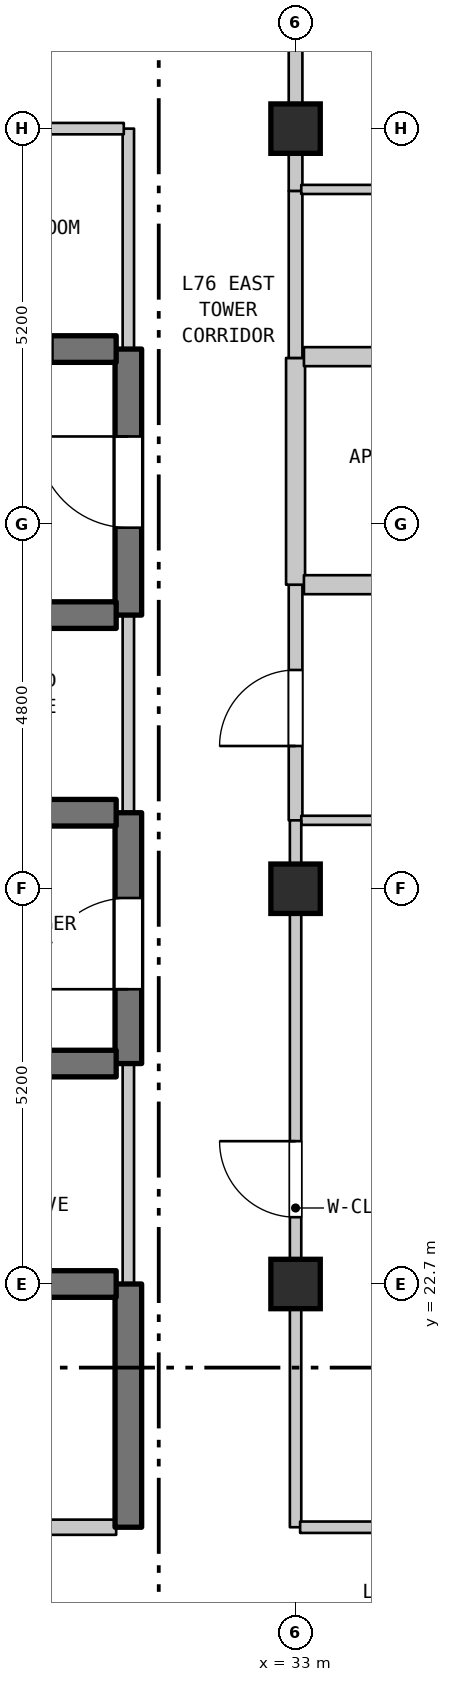
"""IFC4 building model, lengths in metres.
Left out: names, types, materials, properties, quantities, classifications, styles, units other than length and angle.
Written with IfcOpenShell. Run it as: python <this file> out.ifc"""

import sys

from ifc_helpers import new_model, si_unit, direction, frame, frame_2d, origin, origin_2d, place, context, subcontext, project, spatial, rectangle, extrude, element, fill, save


model = new_model("IFC4")
c1 = context("Model", 3, precision=1e-05, world=origin(), true_north=direction((0.0, 1.0)))
c2 = subcontext(c1, "Body", "Model", "MODEL_VIEW")
j1 = project(units=[si_unit("LENGTHUNIT", "METRE"), si_unit("PLANEANGLEUNIT", "RADIAN")], contexts=[c1])
p1 = place(None, origin())
s1 = spatial("IfcSite", under=j1, at=p1, CompositionType="ELEMENT")
p2 = place(p1, origin())
s2 = spatial("IfcBuilding", under=s1, at=p2, CompositionType="ELEMENT")
p3 = place(p2, frame((0.0, 0.0, 303.6)))
s3 = spatial("IfcBuildingStorey", under=s2, at=p3, CompositionType="ELEMENT", Elevation=303.6)
for number, where, z_axis, x_axis in (
    (1, (33.0, 22.7, 0.0), (0.0, 0.0, 1.0), (1.0, 0.0, 0.0)),
    (2, (33.0, 27.9, 0.0), (0.0, 0.0, 1.0), (1.0, 0.0, 0.0)),
    (3, (33.0, 37.9, 0.0), (0.0, 0.0, 1.0), (1.0, 0.0, 0.0)),
):
    element("IfcColumn", number, at=place(p3, frame(where, z_axis=z_axis, x_axis=x_axis)), inside=s3, PredefinedType="COLUMN", context=c2, shape_type="SweptSolid", body=[
        extrude(rectangle(XDim=0.65, YDim=0.65, at=origin_2d()), origin(), (0.0, 0.0, 1.0), 3.7),
    ])
p4 = place(p3, frame((30.8, 19.5, 0.0), z_axis=(0.0, 0.0, 1.0), x_axis=(0.0, 1.0, 0.0)))
e4 = element("IfcWall", 4, at=p4, inside=s3, PredefinedType="SHEAR", context=c2, shape_type="SweptSolid", body=[
    extrude(rectangle(XDim=3.2, YDim=0.35, at=frame_2d((1.6, 0.0))), origin(), (0.0, 0.0, 1.0), 3.39),
])
p5 = place(p3, frame((30.8, 22.7, 0.0), z_axis=(0.0, 0.0, 1.0), x_axis=(0.0, 1.0, 0.0)))
e5 = element("IfcWall", 5, at=p5, inside=s3, PredefinedType="STANDARD", context=c2, shape_type="SweptSolid", body=[
    extrude(rectangle(XDim=2.9, YDim=0.15, at=frame_2d((1.45, 0.0))), origin(), (0.0, 0.0, 1.0), 3.39),
])
p6 = place(p3, frame((30.8, 25.6, 0.0), z_axis=(0.0, 0.0, 1.0), x_axis=(0.0, 1.0, 0.0)))
e6 = element("IfcWall", 6, at=p6, inside=s3, PredefinedType="SHEAR", context=c2, shape_type="SweptSolid", body=[
    extrude(rectangle(XDim=3.3, YDim=0.35, at=frame_2d((1.65, 0.0))), origin(), (0.0, 0.0, 1.0), 3.39),
])
p7 = place(p6, frame((0.978, 0.0, 0.0)))
e7 = element("IfcOpeningElement", 7, at=p7, cuts=e6, PredefinedType="OPENING", context=c2, shape_type="SweptSolid", body=[
    extrude(rectangle(XDim=1.2, YDim=2.2, at=frame_2d((0.6, 1.1))), frame((0.0, 0.185, 0.0), z_axis=(0.0, -1.0, 0.0), x_axis=(1.0, 0.0, 0.0)), (0.0, 0.0, 1.0), 0.37),
])
p8 = place(p3, frame((30.8, 28.9, 0.0), z_axis=(0.0, 0.0, 1.0), x_axis=(0.0, 1.0, 0.0)))
e8 = element("IfcWall", 8, at=p8, inside=s3, PredefinedType="STANDARD", context=c2, shape_type="SweptSolid", body=[
    extrude(rectangle(XDim=2.6, YDim=0.15, at=frame_2d((1.3, 0.0))), origin(), (0.0, 0.0, 1.0), 3.39),
])
p9 = place(p3, frame((30.8, 31.5, 0.0), z_axis=(0.0, 0.0, 1.0), x_axis=(0.0, 1.0, 0.0)))
e9 = element("IfcWall", 9, at=p9, inside=s3, PredefinedType="SHEAR", context=c2, shape_type="SweptSolid", body=[
    extrude(rectangle(XDim=3.5, YDim=0.35, at=frame_2d((1.75, 0.0))), origin(), (0.0, 0.0, 1.0), 3.39),
])
p10 = place(p9, frame((1.15, 0.0, 0.0)))
e10 = element("IfcOpeningElement", 10, at=p10, cuts=e9, PredefinedType="OPENING", context=c2, shape_type="SweptSolid", body=[
    extrude(rectangle(XDim=1.2, YDim=2.2, at=frame_2d((0.6, 1.1))), frame((0.0, 0.185, 0.0), z_axis=(0.0, -1.0, 0.0), x_axis=(1.0, 0.0, 0.0)), (0.0, 0.0, 1.0), 0.37),
])
p11 = place(p3, frame((30.8, 35.0, 0.0), z_axis=(0.0, 0.0, 1.0), x_axis=(0.0, 1.0, 0.0)))
e11 = element("IfcWall", 11, at=p11, inside=s3, PredefinedType="STANDARD", context=c2, shape_type="SweptSolid", body=[
    extrude(rectangle(XDim=2.9, YDim=0.15, at=frame_2d((1.45, 0.0))), origin(), (0.0, 0.0, 1.0), 3.39),
])
p12 = place(p3, frame((33.0, 19.5, 0.0), z_axis=(0.0, 0.0, 1.0), x_axis=(0.0, 1.0, 0.0)))
e12 = element("IfcWall", 12, at=p12, inside=s3, PredefinedType="STANDARD", context=c2, shape_type="SweptSolid", body=[
    extrude(rectangle(XDim=8.4, YDim=0.15, at=frame_2d((4.2, 0.0))), origin(), (0.0, 0.0, 1.0), 3.1),
])
p13 = place(p12, frame((4.079, 0.0, 0.0)))
e13 = element("IfcOpeningElement", 13, at=p13, cuts=e12, PredefinedType="OPENING", context=c2, shape_type="SweptSolid", body=[
    extrude(rectangle(XDim=1.0, YDim=2.15, at=frame_2d((0.5, 1.075))), frame((0.0, 0.085, 0.0), z_axis=(0.0, -1.0, 0.0), x_axis=(1.0, 0.0, 0.0)), (0.0, 0.0, 1.0), 0.17),
])
p14 = place(p3, frame((33.0, 28.8, 0.0), z_axis=(0.0, 0.0, 1.0), x_axis=(0.0, 1.0, 0.0)))
e14 = element("IfcWall", 14, at=p14, inside=s3, PredefinedType="STANDARD", context=c2, shape_type="SweptSolid", body=[
    extrude(rectangle(XDim=3.1, YDim=0.18, at=frame_2d((1.55, 0.0))), origin(), (0.0, 0.0, 1.0), 2.89),
])
p15 = place(p14, frame((0.978, 0.0, 0.0)))
e15 = element("IfcOpeningElement", 15, at=p15, cuts=e14, PredefinedType="OPENING", context=c2, shape_type="SweptSolid", body=[
    extrude(rectangle(XDim=1.0, YDim=2.15, at=frame_2d((0.5, 1.075))), frame((0.0, 0.1, 0.0), z_axis=(0.0, -1.0, 0.0), x_axis=(1.0, 0.0, 0.0)), (0.0, 0.0, 1.0), 0.2),
])
p16 = place(p3, frame((33.0, 31.9, 0.0), z_axis=(0.0, 0.0, 1.0), x_axis=(0.0, 1.0, 0.0)))
e16 = element("IfcWall", 16, at=p16, inside=s3, PredefinedType="STANDARD", context=c2, shape_type="SweptSolid", body=[
    extrude(rectangle(XDim=2.983, YDim=0.25, at=frame_2d((1.492, 0.0))), origin(), (0.0, 0.0, 1.0), 2.89),
])
p17 = place(p3, frame((33.0, 34.883, 0.0), z_axis=(0.0, 0.0, 1.0), x_axis=(0.0, 1.0, 0.0)))
e17 = element("IfcWall", 17, at=p17, inside=s3, PredefinedType="STANDARD", context=c2, shape_type="SweptSolid", body=[
    extrude(rectangle(XDim=2.198, YDim=0.18, at=frame_2d((1.099, 0.0))), origin(), (0.0, 0.0, 1.0), 2.89),
])
p18 = place(p3, frame((33.0, 37.081, 0.0), z_axis=(0.0, 0.0, 1.0), x_axis=(0.0, 1.0, 0.0)))
e18 = element("IfcWall", 18, at=p18, inside=s3, PredefinedType="STANDARD", context=c2, shape_type="SweptSolid", body=[
    extrude(rectangle(XDim=0.819, YDim=0.18, at=frame_2d((0.409, 0.0))), origin(), (0.0, 0.0, 1.0), 2.89),
])
p19 = place(p3, frame((25.985, 19.5, 0.0), z_axis=(0.0, 0.0, 1.0), x_axis=(1.0, 0.0, 0.0)))
e19 = element("IfcWall", 19, at=p19, inside=s3, PredefinedType="STANDARD", context=c2, shape_type="SweptSolid", body=[
    extrude(rectangle(XDim=4.655, YDim=0.2, at=frame_2d((2.327, 0.0))), origin(), (0.0, 0.0, 1.0), 3.39),
])
p20 = place(p19, frame((1.845, 0.0, 0.0)))
e20 = element("IfcOpeningElement", 20, at=p20, cuts=e19, PredefinedType="OPENING", context=c2, shape_type="SweptSolid", body=[
    extrude(rectangle(XDim=0.9, YDim=2.15, at=frame_2d((0.45, 1.075))), frame((0.0, 0.11, 0.0), z_axis=(0.0, -1.0, 0.0), x_axis=(1.0, 0.0, 0.0)), (0.0, 0.0, 1.0), 0.22),
])
p21 = place(p3, frame((33.06, 19.5, 0.0), z_axis=(0.0, 0.0, 1.0), x_axis=(1.0, 0.0, 0.0)))
e21 = element("IfcWall", 21, at=p21, inside=s3, PredefinedType="STANDARD", context=c2, shape_type="SweptSolid", body=[
    extrude(rectangle(XDim=8.323, YDim=0.15, at=frame_2d((4.162, 0.0))), origin(), (0.0, 0.0, 1.0), 3.39),
])
p22 = place(p21, frame((3.583, 0.0, 0.0)))
e22 = element("IfcOpeningElement", 22, at=p22, cuts=e21, PredefinedType="OPENING", context=c2, shape_type="SweptSolid", body=[
    extrude(rectangle(XDim=1.0, YDim=2.15, at=frame_2d((0.5, 1.075))), frame((0.0, 0.085, 0.0), z_axis=(0.0, -1.0, 0.0), x_axis=(1.0, 0.0, 0.0)), (0.0, 0.0, 1.0), 0.17),
])
p23 = place(p3, frame((27.46, 22.7, 0.0), z_axis=(0.0, 0.0, 1.0), x_axis=(1.0, 0.0, 0.0)))
e23 = element("IfcWall", 23, at=p23, inside=s3, PredefinedType="SHEAR", context=c2, shape_type="SweptSolid", body=[
    extrude(rectangle(XDim=3.18, YDim=0.35, at=frame_2d((1.59, 0.0))), origin(), (0.0, 0.0, 1.0), 3.39),
])
p24 = place(p3, frame((27.46, 25.6, 0.0), z_axis=(0.0, 0.0, 1.0), x_axis=(1.0, 0.0, 0.0)))
e24 = element("IfcWall", 24, at=p24, inside=s3, PredefinedType="SHEAR", context=c2, shape_type="SweptSolid", body=[
    extrude(rectangle(XDim=3.18, YDim=0.35, at=frame_2d((1.59, 0.0))), origin(), (0.0, 0.0, 1.0), 3.39),
])
p25 = place(p24, frame((1.115, 0.0, 0.0)))
e25 = element("IfcOpeningElement", 25, at=p25, cuts=e24, PredefinedType="OPENING", context=c2, shape_type="SweptSolid", body=[
    extrude(rectangle(XDim=0.95, YDim=2.15, at=frame_2d((0.475, 1.075))), frame((0.0, 0.185, 0.0), z_axis=(0.0, -1.0, 0.0), x_axis=(1.0, 0.0, 0.0)), (0.0, 0.0, 1.0), 0.37),
])
p26 = place(p3, frame((33.075, 28.8, 0.0), z_axis=(0.0, 0.0, 1.0), x_axis=(1.0, 0.0, 0.0)))
e26 = element("IfcWall", 26, at=p26, inside=s3, PredefinedType="PARTITIONING", context=c2, shape_type="SweptSolid", body=[
    extrude(rectangle(XDim=11.707, YDim=0.12, at=frame_2d((5.854, 0.0))), origin(), (0.0, 0.0, 1.0), 3.39),
])
p27 = place(p3, frame((27.46, 28.9, 0.0), z_axis=(0.0, 0.0, 1.0), x_axis=(1.0, 0.0, 0.0)))
e27 = element("IfcWall", 27, at=p27, inside=s3, PredefinedType="SHEAR", context=c2, shape_type="SweptSolid", body=[
    extrude(rectangle(XDim=3.18, YDim=0.35, at=frame_2d((1.59, 0.0))), origin(), (0.0, 0.0, 1.0), 3.39),
])
p28 = place(p27, frame((1.115, 0.0, 0.0)))
e28 = element("IfcOpeningElement", 28, at=p28, cuts=e27, PredefinedType="OPENING", context=c2, shape_type="SweptSolid", body=[
    extrude(rectangle(XDim=0.95, YDim=2.15, at=frame_2d((0.475, 1.075))), frame((0.0, 0.185, 0.0), z_axis=(0.0, -1.0, 0.0), x_axis=(1.0, 0.0, 0.0)), (0.0, 0.0, 1.0), 0.37),
])
p29 = place(p3, frame((27.46, 31.5, 0.0), z_axis=(0.0, 0.0, 1.0), x_axis=(1.0, 0.0, 0.0)))
e29 = element("IfcWall", 29, at=p29, inside=s3, PredefinedType="SHEAR", context=c2, shape_type="SweptSolid", body=[
    extrude(rectangle(XDim=3.18, YDim=0.35, at=frame_2d((1.59, 0.0))), origin(), (0.0, 0.0, 1.0), 3.39),
])
for number, where, z_axis, x_axis in (
    (30, (33.11, 31.9, 0.0), (0.0, 0.0, 1.0), (1.0, 0.0, 0.0)),
    (31, (33.11, 34.9, 0.0), (0.0, 0.0, 1.0), (1.0, 0.0, 0.0)),
):
    element("IfcWall", number, at=place(p3, frame(where, z_axis=z_axis, x_axis=x_axis)), inside=s3, PredefinedType="STANDARD", context=c2, shape_type="SweptSolid", body=[
        extrude(rectangle(XDim=4.36, YDim=0.25, at=frame_2d((2.18, 0.0))), origin(), (0.0, 0.0, 1.0), 3.39),
    ])
p30 = place(p3, frame((28.045, 35.0, 0.0), z_axis=(0.0, 0.0, 1.0), x_axis=(1.0, 0.0, 0.0)))
e32 = element("IfcWall", 32, at=p30, inside=s3, PredefinedType="SHEAR", context=c2, shape_type="SweptSolid", body=[
    extrude(rectangle(XDim=2.595, YDim=0.35, at=frame_2d((1.297, 0.0))), origin(), (0.0, 0.0, 1.0), 3.39),
])
p31 = place(p30, frame((0.806, 0.0, 0.0)))
e33 = element("IfcOpeningElement", 33, at=p31, cuts=e32, PredefinedType="OPENING", context=c2, shape_type="SweptSolid", body=[
    extrude(rectangle(XDim=0.95, YDim=2.15, at=frame_2d((0.475, 1.075))), frame((0.0, 0.185, 0.0), z_axis=(0.0, -1.0, 0.0), x_axis=(1.0, 0.0, 0.0)), (0.0, 0.0, 1.0), 0.37),
])
p32 = place(p3, frame((33.075, 37.1, 0.0), z_axis=(0.0, 0.0, 1.0), x_axis=(1.0, 0.0, 0.0)))
e34 = element("IfcWall", 34, at=p32, inside=s3, PredefinedType="PARTITIONING", context=c2, shape_type="SweptSolid", body=[
    extrude(rectangle(XDim=4.46, YDim=0.12, at=frame_2d((2.23, 0.0))), origin(), (0.0, 0.0, 1.0), 3.39),
])
p33 = place(p3, frame((28.045, 37.9, 0.0), z_axis=(0.0, 0.0, 1.0), x_axis=(1.0, 0.0, 0.0)))
e35 = element("IfcWall", 35, at=p33, inside=s3, PredefinedType="STANDARD", context=c2, shape_type="SweptSolid", body=[
    extrude(rectangle(XDim=2.695, YDim=0.15, at=frame_2d((1.348, 0.0))), origin(), (0.0, 0.0, 1.0), 2.89),
])
p34 = place(p3, frame((33.0, 27.9, 0.0), z_axis=(0.0, 0.0, 1.0), x_axis=(0.0, 1.0, 0.0)))
e36 = element("IfcWall", 36, at=p34, inside=s3, PredefinedType="STANDARD", context=c2, shape_type="SweptSolid", body=[
    extrude(rectangle(XDim=0.9, YDim=0.15, at=frame_2d((0.45, 0.0))), origin(), (0.0, 0.0, 1.0), 2.89),
])
p35 = place(p3, frame((33.0, 37.9, 0.0), z_axis=(0.0, 0.0, 1.0), x_axis=(0.0, 1.0, 0.0)))
e37 = element("IfcWall", 37, at=p35, inside=s3, PredefinedType="STANDARD", context=c2, shape_type="SweptSolid", body=[
    extrude(rectangle(XDim=1.85, YDim=0.18, at=frame_2d((0.925, 0.0))), origin(), (0.0, 0.0, 1.0), 2.79),
])
p36 = place(p7, origin())
e38 = element("IfcDoor", 38, at=p36, inside=s3, OperationType="SINGLE_SWING_LEFT", PredefinedType="DOOR", context=c2, shape_type="SweptSolid", body=[
    extrude(rectangle(XDim=1.2, YDim=2.2, at=frame_2d((0.6, 1.1))), frame((0.0, 0.025, 0.0), z_axis=(0.0, -1.0, 0.0), x_axis=(1.0, 0.0, 0.0)), (0.0, 0.0, 1.0), 0.05),
])
fill(e7, e38)
p37 = place(p10, origin())
e39 = element("IfcDoor", 39, at=p37, inside=s3, OperationType="SINGLE_SWING_RIGHT", PredefinedType="DOOR", context=c2, shape_type="SweptSolid", body=[
    extrude(rectangle(XDim=1.2, YDim=2.2, at=frame_2d((0.6, 1.1))), frame((0.0, 0.025, 0.0), z_axis=(0.0, -1.0, 0.0), x_axis=(1.0, 0.0, 0.0)), (0.0, 0.0, 1.0), 0.05),
])
fill(e10, e39)
p38 = place(p13, origin())
e40 = element("IfcDoor", 40, at=p38, inside=s3, OperationType="SINGLE_SWING_RIGHT", PredefinedType="DOOR", context=c2, shape_type="SweptSolid", body=[
    extrude(rectangle(XDim=1.0, YDim=2.15, at=frame_2d((0.5, 1.075))), frame((0.0, 0.025, 0.0), z_axis=(0.0, -1.0, 0.0), x_axis=(1.0, 0.0, 0.0)), (0.0, 0.0, 1.0), 0.05),
])
fill(e13, e40)
p39 = place(p15, origin())
e41 = element("IfcDoor", 41, at=p39, inside=s3, OperationType="SINGLE_SWING_LEFT", PredefinedType="DOOR", context=c2, shape_type="SweptSolid", body=[
    extrude(rectangle(XDim=1.0, YDim=2.15, at=frame_2d((0.5, 1.075))), frame((0.0, 0.025, 0.0), z_axis=(0.0, -1.0, 0.0), x_axis=(1.0, 0.0, 0.0)), (0.0, 0.0, 1.0), 0.05),
])
fill(e15, e41)
p40 = place(p31, frame((0.95, 0.0, 0.0), z_axis=(0.0, 0.0, 1.0), x_axis=(-1.0, 0.0, 0.0)))
e42 = element("IfcDoor", 42, at=p40, inside=s3, OperationType="SINGLE_SWING_LEFT", PredefinedType="DOOR", context=c2, shape_type="SweptSolid", body=[
    extrude(rectangle(XDim=0.95, YDim=2.15, at=frame_2d((0.475, 1.075))), frame((0.0, 0.025, 0.0), z_axis=(0.0, -1.0, 0.0), x_axis=(1.0, 0.0, 0.0)), (0.0, 0.0, 1.0), 0.05),
])
fill(e33, e42)
save(model, sys.argv[1])
